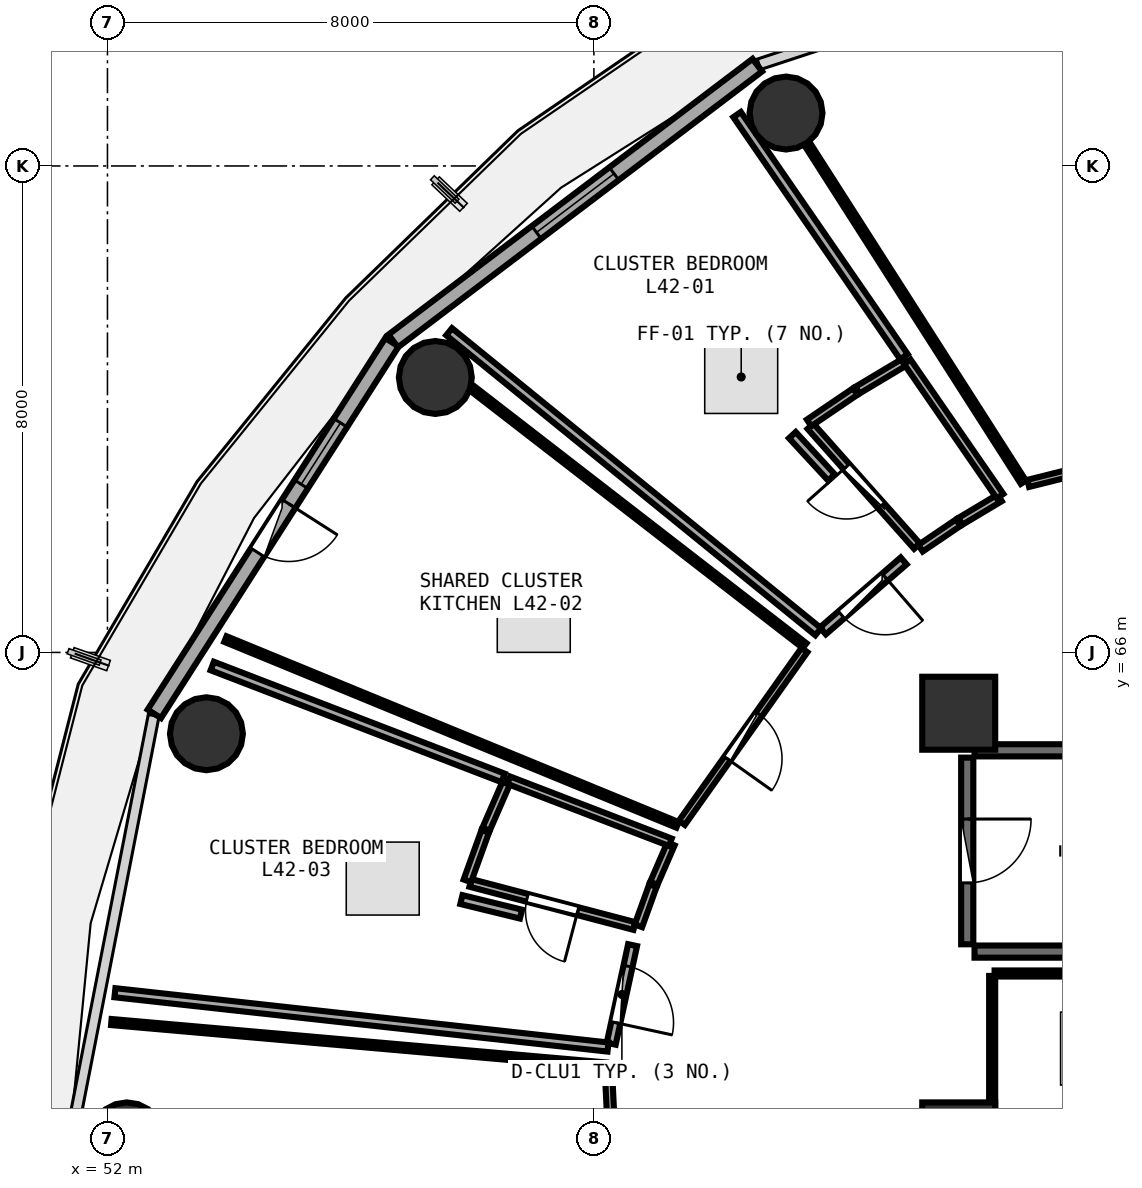
"""IFC4 building model, lengths in metres.
Left out: names, types, materials, properties, quantities, classifications, styles, units other than length and angle.
Written with IfcOpenShell. Run it as: python <this file> out.ifc"""

import sys

from ifc_helpers import new_model, si_unit, direction, frame, frame_2d, origin, origin_2d, place, context, subcontext, project, spatial, rectangle, circle, extrude, element, fill, save


model = new_model("IFC4")
c1 = context("Model", 3, precision=1e-05, world=origin(), true_north=direction((0.0, 1.0)))
c2 = subcontext(c1, "Body", "Model", "MODEL_VIEW")
j1 = project(units=[si_unit("LENGTHUNIT", "METRE"), si_unit("PLANEANGLEUNIT", "RADIAN")], contexts=[c1])
p1 = place(None, origin())
s1 = spatial("IfcSite", under=j1, at=p1, CompositionType="ELEMENT")
p2 = place(p1, origin())
s2 = spatial("IfcBuilding", under=s1, at=p2, CompositionType="ELEMENT")
p3 = place(p2, frame((0.0, 0.0, 165.6)))
s3 = spatial("IfcBuildingStorey", under=s2, at=p3, CompositionType="ELEMENT", Elevation=165.6)
for number, where, z_axis, x_axis in (
    (1, (66.0, 65.0, 0.0), (0.0, 0.0, 1.0), (1.0, 0.0, 0.0)),
    (2, (66.0, 58.0, 0.0), (0.0, 0.0, 1.0), (1.0, 0.0, 0.0)),
):
    element("IfcColumn", number, at=place(p3, frame(where, z_axis=z_axis, x_axis=x_axis)), inside=s3, PredefinedType="PILASTER", context=c2, shape_type="SweptSolid", body=[
        extrude(rectangle(XDim=1.2, YDim=1.2, at=origin_2d()), origin(), (0.0, 0.0, 1.0), 3.75),
    ])
for number, where, z_axis, x_axis in (
    (3, (63.16, 74.87, 0.0), (0.0, 0.0, 1.0), (1.0, 0.0, 0.0)),
    (4, (57.392, 70.521, 0.0), (0.0, 0.0, 1.0), (1.0, 0.0, 0.0)),
    (5, (53.627, 64.663, 0.0), (0.0, 0.0, 1.0), (1.0, 0.0, 0.0)),
    (6, (52.32, 58.0, 0.0), (0.0, 0.0, 1.0), (1.0, 0.0, 0.0)),
):
    element("IfcColumn", number, at=place(p3, frame(where, z_axis=z_axis, x_axis=x_axis)), inside=s3, PredefinedType="COLUMN", context=c2, shape_type="SweptSolid", body=[
        extrude(circle(Radius=0.6, at=origin_2d()), origin(), (0.0, 0.0, 1.0), 3.75),
    ])
p4 = place(p3, frame((62.688, 75.658, 0.0), z_axis=(0.0, 0.0, 1.0), x_axis=(-0.797163719609, -0.603763202042, 0.0)))
e7 = element("IfcWall", 7, at=p4, inside=s3, PredefinedType="SOLIDWALL", context=c2, shape_type="SweptSolid", body=[
    extrude(rectangle(XDim=7.512, YDim=0.26, at=frame_2d((3.756, 0.0))), origin(), (0.0, 0.0, 1.0), 3.475),
])
p5 = place(p4, frame((2.956, 0.0, 0.85)))
e8 = element("IfcOpeningElement", 8, at=p5, cuts=e7, PredefinedType="OPENING", context=c2, shape_type="SweptSolid", body=[
    extrude(rectangle(XDim=1.6, YDim=1.45, at=frame_2d((0.8, 0.725))), frame((0.0, 0.14, 0.0), z_axis=(0.0, -1.0, 0.0), x_axis=(1.0, 0.0, 0.0)), (0.0, 0.0, 1.0), 0.28),
])
p6 = place(p3, frame((56.679, 71.1, 0.0), z_axis=(0.0, 0.0, 1.0), x_axis=(-0.538801521808, -0.842432739213, 0.0)))
e9 = element("IfcWall", 9, at=p6, inside=s3, PredefinedType="SOLIDWALL", context=c2, shape_type="SweptSolid", body=[
    extrude(rectangle(XDim=7.253, YDim=0.26, at=frame_2d((3.627, 0.0))), origin(), (0.0, 0.0, 1.0), 3.475),
])
p7 = place(p6, frame((3.152, 0.0, 0.0)))
e10 = element("IfcOpeningElement", 10, at=p7, cuts=e9, PredefinedType="OPENING", context=c2, shape_type="SweptSolid", body=[
    extrude(rectangle(XDim=0.95, YDim=2.1, at=frame_2d((0.475, 1.05))), frame((0.0, 0.14, 0.0), z_axis=(0.0, -1.0, 0.0), x_axis=(1.0, 0.0, 0.0)), (0.0, 0.0, 1.0), 0.28),
])
p8 = place(p6, frame((1.572, 0.0, 0.85)))
e11 = element("IfcOpeningElement", 11, at=p8, cuts=e9, PredefinedType="OPENING", context=c2, shape_type="SweptSolid", body=[
    extrude(rectangle(XDim=1.2, YDim=1.45, at=frame_2d((0.6, 0.725))), frame((0.0, 0.14, 0.0), z_axis=(0.0, -1.0, 0.0), x_axis=(1.0, 0.0, 0.0)), (0.0, 0.0, 1.0), 0.28),
])
for number, where, z_axis, x_axis in (
    (12, (66.26, 61.08, 0.0), (0.0, 0.0, 1.0), (1.0, 0.0, 0.0)),
    (13, (73.42, 64.39, 0.0), (0.0, 0.0, 1.0), (-1.0, 0.0, 0.0)),
):
    element("IfcWall", number, at=place(p3, frame(where, z_axis=z_axis, x_axis=x_axis)), inside=s3, PredefinedType="SHEAR", context=c2, shape_type="SweptSolid", body=[
        extrude(rectangle(XDim=7.16, YDim=0.2, at=frame_2d((3.58, 0.0))), origin(), (0.0, 0.0, 1.0), 3.49),
    ])
p9 = place(p3, frame((66.14, 64.27, 0.0), z_axis=(0.0, 0.0, 1.0), x_axis=(0.0, -1.0, 0.0)))
e14 = element("IfcWall", 14, at=p9, inside=s3, PredefinedType="SHEAR", context=c2, shape_type="SweptSolid", body=[
    extrude(rectangle(XDim=3.07, YDim=0.2, at=frame_2d((1.535, 0.0))), origin(), (0.0, 0.0, 1.0), 3.49),
])
p10 = place(p9, frame((1.01, 0.0, 0.0)))
e15 = element("IfcOpeningElement", 15, at=p10, cuts=e14, PredefinedType="OPENING", context=c2, shape_type="SweptSolid", body=[
    extrude(rectangle(XDim=1.05, YDim=2.1, at=frame_2d((0.525, 1.05))), frame((0.0, 0.11, 0.0), z_axis=(0.0, -1.0, 0.0), x_axis=(1.0, 0.0, 0.0)), (0.0, 0.0, 1.0), 0.22),
])
p11 = place(p3, frame((73.701, 70.414, 0.0), z_axis=(0.0, 0.0, 1.0), x_axis=(-0.970327101986, -0.241796019718, 0.0)))
e16 = element("IfcWall", 16, at=p11, inside=s3, PredefinedType="PARTITIONING", context=c2, shape_type="SweptSolid", body=[
    extrude(rectangle(XDim=6.758, YDim=0.12, at=frame_2d((3.379, 0.0))), origin(), (0.0, 0.0, 1.0), 2.975),
])
p12 = place(p11, frame((2.929, 0.0, 0.0)))
e17 = element("IfcOpeningElement", 17, at=p12, cuts=e16, PredefinedType="OPENING", context=c2, shape_type="SweptSolid", body=[
    extrude(rectangle(XDim=0.9, YDim=2.08, at=frame_2d((0.45, 1.04))), frame((0.0, 0.07, 0.0), z_axis=(0.0, -1.0, 0.0), x_axis=(1.0, 0.0, 0.0)), (0.0, 0.0, 1.0), 0.14),
])
p13 = place(p3, frame((65.315, 67.747, 0.0), z_axis=(0.0, 0.0, 1.0), x_axis=(-0.664185753234, 0.74756757902, 0.0)))
e18 = element("IfcWall", 18, at=p13, inside=s3, PredefinedType="PLUMBINGWALL", context=c2, shape_type="SweptSolid", body=[
    extrude(rectangle(XDim=2.638, YDim=0.13, at=frame_2d((1.319, 0.0))), origin(), (0.0, 0.0, 1.0), 2.975),
])
p14 = place(p13, frame((0.889, 0.0, 0.0)))
e19 = element("IfcOpeningElement", 19, at=p14, cuts=e18, PredefinedType="OPENING", context=c2, shape_type="SweptSolid", body=[
    extrude(rectangle(XDim=0.86, YDim=2.05, at=frame_2d((0.43, 1.025))), frame((0.0, 0.075, 0.0), z_axis=(0.0, -1.0, 0.0), x_axis=(1.0, 0.0, 0.0)), (0.0, 0.0, 1.0), 0.15),
])
p15 = place(p3, frame((65.094, 67.505, 0.0), z_axis=(0.0, 0.0, 1.0), x_axis=(-0.756110527693, -0.654443939472, 0.0)))
e20 = element("IfcWall", 20, at=p15, inside=s3, PredefinedType="PARTITIONING", context=c2, shape_type="SweptSolid", body=[
    extrude(rectangle(XDim=1.758, YDim=0.15, at=frame_2d((0.879, 0.0))), origin(), (0.0, 0.0, 1.0), 2.975),
])
p16 = place(p15, frame((0.404, 0.0, 0.0)))
e21 = element("IfcOpeningElement", 21, at=p16, cuts=e20, PredefinedType="OPENING", context=c2, shape_type="SweptSolid", body=[
    extrude(rectangle(XDim=0.95, YDim=2.08, at=frame_2d((0.475, 1.04))), frame((0.0, 0.085, 0.0), z_axis=(0.0, -1.0, 0.0), x_axis=(1.0, 0.0, 0.0)), (0.0, 0.0, 1.0), 0.17),
])
p17 = place(p3, frame((63.462, 66.038, 0.0), z_axis=(0.0, 0.0, 1.0), x_axis=(-0.578762045024, -0.815496471629, 0.0)))
e22 = element("IfcWall", 22, at=p17, inside=s3, PredefinedType="PARTITIONING", context=c2, shape_type="SweptSolid", body=[
    extrude(rectangle(XDim=3.483, YDim=0.12, at=frame_2d((1.741, 0.0))), origin(), (0.0, 0.0, 1.0), 2.975),
])
p18 = place(p17, frame((1.291, 0.0, 0.0)))
e23 = element("IfcOpeningElement", 23, at=p18, cuts=e22, PredefinedType="OPENING", context=c2, shape_type="SweptSolid", body=[
    extrude(rectangle(XDim=0.9, YDim=2.08, at=frame_2d((0.45, 1.04))), frame((0.0, 0.07, 0.0), z_axis=(0.0, -1.0, 0.0), x_axis=(1.0, 0.0, 0.0)), (0.0, 0.0, 1.0), 0.14),
])
p19 = place(p3, frame((60.667, 61.5, 0.0), z_axis=(0.0, 0.0, 1.0), x_axis=(-0.967098346806, 0.254402805813, 0.0)))
e24 = element("IfcWall", 24, at=p19, inside=s3, PredefinedType="PLUMBINGWALL", context=c2, shape_type="SweptSolid", body=[
    extrude(rectangle(XDim=2.789, YDim=0.13, at=frame_2d((1.395, 0.0))), origin(), (0.0, 0.0, 1.0), 3.175),
])
p20 = place(p19, frame((0.964, 0.0, 0.0)))
e25 = element("IfcOpeningElement", 25, at=p20, cuts=e24, PredefinedType="OPENING", context=c2, shape_type="SweptSolid", body=[
    extrude(rectangle(XDim=0.86, YDim=2.05, at=frame_2d((0.43, 1.025))), frame((0.0, 0.075, 0.0), z_axis=(0.0, -1.0, 0.0), x_axis=(1.0, 0.0, 0.0)), (0.0, 0.0, 1.0), 0.15),
])
p21 = place(p3, frame((60.636, 61.186, 0.0), z_axis=(0.0, 0.0, 1.0), x_axis=(-0.211879832264, -0.977295726318, 0.0)))
e26 = element("IfcWall", 26, at=p21, inside=s3, PredefinedType="PARTITIONING", context=c2, shape_type="SweptSolid", body=[
    extrude(rectangle(XDim=1.659, YDim=0.15, at=frame_2d((0.83, 0.0))), origin(), (0.0, 0.0, 1.0), 3.48),
])
p22 = place(p21, frame((0.355, 0.0, 0.0)))
e27 = element("IfcOpeningElement", 27, at=p22, cuts=e26, PredefinedType="OPENING", context=c2, shape_type="SweptSolid", body=[
    extrude(rectangle(XDim=0.95, YDim=2.08, at=frame_2d((0.475, 1.04))), frame((0.0, 0.085, 0.0), z_axis=(0.0, -1.0, 0.0), x_axis=(1.0, 0.0, 0.0)), (0.0, 0.0, 1.0), 0.17),
])
p23 = place(p3, frame((60.238, 59.144, 0.0), z_axis=(0.0, 0.0, 1.0), x_axis=(0.048537190422, -0.998821375996, 0.0)))
e28 = element("IfcWall", 28, at=p23, inside=s3, PredefinedType="PARTITIONING", context=c2, shape_type="SweptSolid", body=[
    extrude(rectangle(XDim=3.365, YDim=0.12, at=frame_2d((1.683, 0.0))), origin(), (0.0, 0.0, 1.0), 2.975),
])
p24 = place(p23, frame((1.233, 0.0, 0.0)))
e29 = element("IfcOpeningElement", 29, at=p24, cuts=e28, PredefinedType="OPENING", context=c2, shape_type="SweptSolid", body=[
    extrude(rectangle(XDim=0.9, YDim=2.08, at=frame_2d((0.45, 1.04))), frame((0.0, 0.07, 0.0), z_axis=(0.0, -1.0, 0.0), x_axis=(1.0, 0.0, 0.0)), (0.0, 0.0, 1.0), 0.14),
])
p25 = place(p3, frame((69.96, 60.72, 0.0), z_axis=(0.0, 0.0, 1.0), x_axis=(-1.0, 0.0, 0.0)))
e30 = element("IfcWall", 30, at=p25, inside=s3, PredefinedType="PARTITIONING", context=c2, shape_type="SweptSolid", body=[
    extrude(rectangle(XDim=3.37, YDim=0.1, at=frame_2d((1.685, 0.0))), origin(), (0.0, 0.0, 1.0), 3.48),
])
p26 = place(p3, frame((66.55, 60.68, 0.0), z_axis=(0.0, 0.0, 1.0), x_axis=(0.0, -1.0, 0.0)))
e31 = element("IfcWall", 31, at=p26, inside=s3, PredefinedType="PARTITIONING", context=c2, shape_type="SweptSolid", body=[
    extrude(rectangle(XDim=2.383, YDim=0.1, at=frame_2d((1.191, 0.0))), origin(), (0.0, 0.0, 1.0), 3.48),
])
p27 = place(p3, frame((67.063, 68.799, 0.0), z_axis=(0.0, 0.0, 1.0), x_axis=(-0.538644897025, 0.842532892479, 0.0)))
e32 = element("IfcWall", 32, at=p27, inside=s3, PredefinedType="PARTITIONING", context=c2, shape_type="SweptSolid", body=[
    extrude(rectangle(XDim=6.594, YDim=0.1, at=frame_2d((3.297, 0.0))), origin(), (0.0, 0.0, 1.0), 3.175),
])
p28 = place(p3, frame((66.675, 68.543, 0.0), z_axis=(0.0, 0.0, 1.0), x_axis=(-0.85851758599, -0.5127841208, 0.0)))
e33 = element("IfcWall", 33, at=p28, inside=s3, PredefinedType="PLUMBINGWALL", context=c2, shape_type="SweptSolid", body=[
    extrude(rectangle(XDim=0.756, YDim=0.13, at=frame_2d((0.378, 0.0))), origin(), (0.0, 0.0, 1.0), 3.48),
])
p29 = place(p3, frame((65.992, 68.134, 0.0), z_axis=(0.0, 0.0, 1.0), x_axis=(-0.82786992474, -0.560920125964, 0.0)))
e34 = element("IfcWall", 34, at=p29, inside=s3, PredefinedType="PLUMBINGWALL", context=c2, shape_type="SweptSolid", body=[
    extrude(rectangle(XDim=0.75, YDim=0.13, at=frame_2d((0.375, 0.0))), origin(), (0.0, 0.0, 1.0), 2.975),
])
p30 = place(p3, frame((63.54, 69.775, 0.0), z_axis=(0.0, 0.0, 1.0), x_axis=(0.827440475962, 0.561553433558, 0.0)))
e35 = element("IfcWall", 35, at=p30, inside=s3, PredefinedType="PLUMBINGWALL", context=c2, shape_type="SweptSolid", body=[
    extrude(rectangle(XDim=0.918, YDim=0.13, at=frame_2d((0.459, 0.0))), origin(), (0.0, 0.0, 1.0), 2.975),
])
p31 = place(p3, frame((64.333, 70.312, 0.0), z_axis=(0.0, 0.0, 1.0), x_axis=(0.858494754448, 0.512822344077, 0.0)))
e36 = element("IfcWall", 36, at=p31, inside=s3, PredefinedType="PLUMBINGWALL", context=c2, shape_type="SweptSolid", body=[
    extrude(rectangle(XDim=0.923, YDim=0.13, at=frame_2d((0.461, 0.0))), origin(), (0.0, 0.0, 1.0), 2.975),
])
p32 = place(p3, frame((65.154, 70.78, 0.0), z_axis=(0.0, 0.0, 1.0), x_axis=(0.568302093988, -0.822819986369, 0.0)))
e37 = element("IfcWall", 37, at=p32, inside=s3, PredefinedType="PLUMBINGWALL", context=c2, shape_type="SweptSolid", body=[
    extrude(rectangle(XDim=2.686, YDim=0.13, at=frame_2d((1.343, 0.0))), origin(), (0.0, 0.0, 1.0), 3.235),
])
p33 = place(p3, frame((63.689, 66.34, 0.0), z_axis=(0.0, 0.0, 1.0), x_axis=(-0.77600992695, 0.630720693553, 0.0)))
e38 = element("IfcWall", 38, at=p33, inside=s3, PredefinedType="PARTITIONING", context=c2, shape_type="SweptSolid", body=[
    extrude(rectangle(XDim=7.822, YDim=0.15, at=frame_2d((3.911, 0.0))), origin(), (0.0, 0.0, 1.0), 2.975),
])
p34 = place(p3, frame((62.355, 74.845, 0.0), z_axis=(0.0, 0.0, 1.0), x_axis=(0.56747106095, -0.823393341596, 0.0)))
e39 = element("IfcWall", 39, at=p34, inside=s3, PredefinedType="PARTITIONING", context=c2, shape_type="SweptSolid", body=[
    extrude(rectangle(XDim=4.837, YDim=0.15, at=frame_2d((2.418, 0.0))), origin(), (0.0, 0.0, 1.0), 2.975),
])
p35 = place(p3, frame((63.264, 69.573, 0.0), z_axis=(0.0, 0.0, 1.0), x_axis=(0.678771543933, -0.734349502041, 0.0)))
e40 = element("IfcWall", 40, at=p35, inside=s3, PredefinedType="PARTITIONING", context=c2, shape_type="SweptSolid", body=[
    extrude(rectangle(XDim=0.949, YDim=0.15, at=frame_2d((0.474, 0.0))), origin(), (0.0, 0.0, 1.0), 3.48),
])
p36 = place(p3, frame((61.375, 63.164, 0.0), z_axis=(0.0, 0.0, 1.0), x_axis=(-0.924943940784, 0.380103546953, 0.0)))
e41 = element("IfcWall", 41, at=p36, inside=s3, PredefinedType="PARTITIONING", context=c2, shape_type="SweptSolid", body=[
    extrude(rectangle(XDim=8.038, YDim=0.1, at=frame_2d((4.019, 0.0))), origin(), (0.0, 0.0, 1.0), 2.975),
])
p37 = place(p3, frame((57.992, 70.346, 0.0), z_axis=(0.0, 0.0, 1.0), x_axis=(0.790939607083, -0.611894221207, 0.0)))
e42 = element("IfcWall", 42, at=p37, inside=s3, PredefinedType="PARTITIONING", context=c2, shape_type="SweptSolid", body=[
    extrude(rectangle(XDim=6.92, YDim=0.1, at=frame_2d((3.46, 0.0))), origin(), (0.0, 0.0, 1.0), 2.975),
])
p38 = place(p3, frame((61.268, 62.853, 0.0), z_axis=(0.0, 0.0, 1.0), x_axis=(-0.398284741881, -0.917261829787, 0.0)))
e43 = element("IfcWall", 43, at=p38, inside=s3, PredefinedType="PLUMBINGWALL", context=c2, shape_type="SweptSolid", body=[
    extrude(rectangle(XDim=0.708, YDim=0.13, at=frame_2d((0.354, 0.0))), origin(), (0.0, 0.0, 1.0), 3.235),
])
p39 = place(p3, frame((60.971, 62.166, 0.0), z_axis=(0.0, 0.0, 1.0), x_axis=(-0.340044773791, -0.940409246987, 0.0)))
e44 = element("IfcWall", 44, at=p39, inside=s3, PredefinedType="PLUMBINGWALL", context=c2, shape_type="SweptSolid", body=[
    extrude(rectangle(XDim=0.704, YDim=0.13, at=frame_2d((0.352, 0.0))), origin(), (0.0, 0.0, 1.0), 3.235),
])
p40 = place(p3, frame((57.919, 62.244, 0.0), z_axis=(0.0, 0.0, 1.0), x_axis=(0.339790338004, 0.9405012101, 0.0)))
e45 = element("IfcWall", 45, at=p40, inside=s3, PredefinedType="PLUMBINGWALL", context=c2, shape_type="SweptSolid", body=[
    extrude(rectangle(XDim=0.864, YDim=0.13, at=frame_2d((0.432, 0.0))), origin(), (0.0, 0.0, 1.0), 3.175),
])
p41 = place(p3, frame((58.227, 63.093, 0.0), z_axis=(0.0, 0.0, 1.0), x_axis=(0.39925148709, 0.916841453064, 0.0)))
e46 = element("IfcWall", 46, at=p41, inside=s3, PredefinedType="PLUMBINGWALL", context=c2, shape_type="SweptSolid", body=[
    extrude(rectangle(XDim=0.866, YDim=0.13, at=frame_2d((0.433, 0.0))), origin(), (0.0, 0.0, 1.0), 3.175),
])
p42 = place(p3, frame((58.6, 63.899, 0.0), z_axis=(0.0, 0.0, 1.0), x_axis=(0.933544382438, -0.358461833418, 0.0)))
e47 = element("IfcWall", 47, at=p42, inside=s3, PredefinedType="PLUMBINGWALL", context=c2, shape_type="SweptSolid", body=[
    extrude(rectangle(XDim=2.847, YDim=0.13, at=frame_2d((1.423, 0.0))), origin(), (0.0, 0.0, 1.0), 3.175),
])
p43 = place(p3, frame((60.232, 59.51, 0.0), z_axis=(0.0, 0.0, 1.0), x_axis=(-0.993990557846, 0.109465843587, 0.0)))
e48 = element("IfcWall", 48, at=p43, inside=s3, PredefinedType="PARTITIONING", context=c2, shape_type="SweptSolid", body=[
    extrude(rectangle(XDim=8.158, YDim=0.15, at=frame_2d((4.079, 0.0))), origin(), (0.0, 0.0, 1.0), 3.025),
])
p44 = place(p3, frame((53.723, 65.777, 0.0), z_axis=(0.0, 0.0, 1.0), x_axis=(0.933303856141, -0.359087610636, 0.0)))
e49 = element("IfcWall", 49, at=p44, inside=s3, PredefinedType="PARTITIONING", context=c2, shape_type="SweptSolid", body=[
    extrude(rectangle(XDim=5.125, YDim=0.15, at=frame_2d((2.562, 0.0))), origin(), (0.0, 0.0, 1.0), 2.975),
])
p45 = place(p3, frame((57.821, 61.936, 0.0), z_axis=(0.0, 0.0, 1.0), x_axis=(0.971451046406, -0.237240098712, 0.0)))
e50 = element("IfcWall", 50, at=p45, inside=s3, PredefinedType="PARTITIONING", context=c2, shape_type="SweptSolid", body=[
    extrude(rectangle(XDim=1.01, YDim=0.15, at=frame_2d((0.505, 0.0))), origin(), (0.0, 0.0, 1.0), 3.175),
])
p46 = place(p3, frame((52.064, 59.921, 0.0), z_axis=(0.0, 0.0, 1.0), x_axis=(0.996168646625, -0.087453001553, 0.0)))
e51 = element("IfcWall", 51, at=p46, inside=s3, PredefinedType="PARTITIONING", context=c2, shape_type="SweptSolid", body=[
    extrude(rectangle(XDim=8.163, YDim=0.1, at=frame_2d((4.082, 0.0))), origin(), (0.0, 0.0, 1.0), 3.025),
])
p47 = place(p5, origin())
e52 = element("IfcWindow", 52, at=p47, inside=s3, PartitioningType="SINGLE_PANEL", PredefinedType="WINDOW", context=c2, shape_type="SweptSolid", body=[
    extrude(rectangle(XDim=1.6, YDim=1.45, at=frame_2d((0.8, 0.725))), frame((0.0, 0.03, 0.0), z_axis=(0.0, -1.0, 0.0), x_axis=(1.0, 0.0, 0.0)), (0.0, 0.0, 1.0), 0.06),
])
fill(e8, e52)
p48 = place(p7, frame((0.95, 0.0, 0.0), z_axis=(0.0, 0.0, 1.0), x_axis=(-1.0, 0.0, 0.0)))
e53 = element("IfcDoor", 53, at=p48, inside=s3, OperationType="SINGLE_SWING_RIGHT", PredefinedType="DOOR", context=c2, shape_type="SweptSolid", body=[
    extrude(rectangle(XDim=0.95, YDim=2.1, at=frame_2d((0.475, 1.05))), frame((0.0, 0.025, 0.0), z_axis=(0.0, -1.0, 0.0), x_axis=(1.0, 0.0, 0.0)), (0.0, 0.0, 1.0), 0.05),
])
fill(e10, e53)
p49 = place(p8, origin())
e54 = element("IfcWindow", 54, at=p49, inside=s3, PartitioningType="SINGLE_PANEL", PredefinedType="WINDOW", context=c2, shape_type="SweptSolid", body=[
    extrude(rectangle(XDim=1.2, YDim=1.45, at=frame_2d((0.6, 0.725))), frame((0.0, 0.03, 0.0), z_axis=(0.0, -1.0, 0.0), x_axis=(1.0, 0.0, 0.0)), (0.0, 0.0, 1.0), 0.06),
])
fill(e11, e54)
p50 = place(p10, origin())
e55 = element("IfcDoor", 55, at=p50, inside=s3, OperationType="SINGLE_SWING_LEFT", PredefinedType="DOOR", context=c2, shape_type="SweptSolid", body=[
    extrude(rectangle(XDim=1.05, YDim=2.1, at=frame_2d((0.525, 1.05))), frame((0.0, 0.025, 0.0), z_axis=(0.0, -1.0, 0.0), x_axis=(1.0, 0.0, 0.0)), (0.0, 0.0, 1.0), 0.05),
])
fill(e15, e55)
p51 = place(p14, origin())
e56 = element("IfcDoor", 56, at=p51, inside=s3, OperationType="SINGLE_SWING_RIGHT", PredefinedType="DOOR", context=c2, shape_type="SweptSolid", body=[
    extrude(rectangle(XDim=0.86, YDim=2.05, at=frame_2d((0.43, 1.025))), frame((0.0, 0.025, 0.0), z_axis=(0.0, -1.0, 0.0), x_axis=(1.0, 0.0, 0.0)), (0.0, 0.0, 1.0), 0.05),
])
fill(e19, e56)
p52 = place(p16, origin())
e57 = element("IfcDoor", 57, at=p52, inside=s3, OperationType="SINGLE_SWING_LEFT", PredefinedType="DOOR", context=c2, shape_type="SweptSolid", body=[
    extrude(rectangle(XDim=0.95, YDim=2.08, at=frame_2d((0.475, 1.04))), frame((0.0, 0.025, 0.0), z_axis=(0.0, -1.0, 0.0), x_axis=(1.0, 0.0, 0.0)), (0.0, 0.0, 1.0), 0.05),
])
fill(e21, e57)
p53 = place(p18, origin())
e58 = element("IfcDoor", 58, at=p53, inside=s3, OperationType="SINGLE_SWING_RIGHT", PredefinedType="DOOR", context=c2, shape_type="SweptSolid", body=[
    extrude(rectangle(XDim=0.9, YDim=2.08, at=frame_2d((0.45, 1.04))), frame((0.0, 0.025, 0.0), z_axis=(0.0, -1.0, 0.0), x_axis=(1.0, 0.0, 0.0)), (0.0, 0.0, 1.0), 0.05),
])
fill(e23, e58)
p54 = place(p20, origin())
e59 = element("IfcDoor", 59, at=p54, inside=s3, OperationType="SINGLE_SWING_LEFT", PredefinedType="DOOR", context=c2, shape_type="SweptSolid", body=[
    extrude(rectangle(XDim=0.86, YDim=2.05, at=frame_2d((0.43, 1.025))), frame((0.0, 0.025, 0.0), z_axis=(0.0, -1.0, 0.0), x_axis=(1.0, 0.0, 0.0)), (0.0, 0.0, 1.0), 0.05),
])
fill(e25, e59)
p55 = place(p22, origin())
e60 = element("IfcDoor", 60, at=p55, inside=s3, OperationType="SINGLE_SWING_RIGHT", PredefinedType="DOOR", context=c2, shape_type="SweptSolid", body=[
    extrude(rectangle(XDim=0.95, YDim=2.08, at=frame_2d((0.475, 1.04))), frame((0.0, 0.025, 0.0), z_axis=(0.0, -1.0, 0.0), x_axis=(1.0, 0.0, 0.0)), (0.0, 0.0, 1.0), 0.05),
])
fill(e27, e60)
save(model, sys.argv[1])
